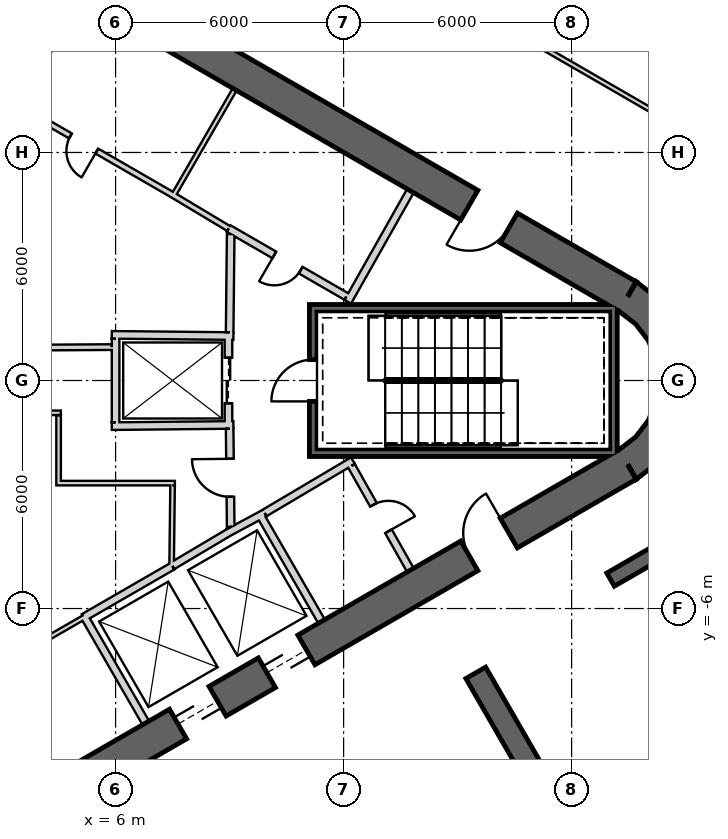
"""IFC4 building model, lengths in metres.
Left out: names, types, materials, properties, quantities, classifications, styles, units other than length and angle.
Written with IfcOpenShell. Run it as: python <this file> out.ifc"""

import sys

from ifc_helpers import new_model, si_unit, direction, frame, frame_2d, origin, place, context, subcontext, project, spatial, polyline, rectangle, outline, extrude, element, fill, save


model = new_model("IFC4")
c1 = context("Model", 3, precision=1e-05, world=origin(), true_north=direction((0.0, 1.0)))
c2 = subcontext(c1, "Body", "Model", "MODEL_VIEW")
j1 = project(units=[si_unit("LENGTHUNIT", "METRE"), si_unit("PLANEANGLEUNIT", "RADIAN")], contexts=[c1])
p1 = place(None, origin())
s1 = spatial("IfcSite", under=j1, at=p1, CompositionType="ELEMENT")
p2 = place(p1, origin())
s2 = spatial("IfcBuilding", under=s1, at=p2, CompositionType="ELEMENT")
p3 = place(p2, frame((0.0, 0.0, -11.0)))
s3 = spatial("IfcBuildingStorey", under=s2, at=p3, CompositionType="ELEMENT", Elevation=-11.0)
p4 = place(p3, frame((19.475, 2.208, -0.4), z_axis=(0.0, 0.0, 1.0), x_axis=(-0.866028369851, 0.499994862586, 0.0)))
e1 = element("IfcWall", 1, at=p4, inside=s3, PredefinedType="SHEAR", context=c2, shape_type="SweptSolid", body=[
    extrude(rectangle(XDim=31.523, YDim=0.9, at=frame_2d((15.762, 0.0))), origin(), (0.0, 0.0, 1.0), 5.9),
])
p5 = place(p4, frame((3.612, 0.0, 0.4)))
e2 = element("IfcOpeningElement", 2, at=p5, cuts=e1, PredefinedType="OPENING", context=c2, shape_type="SweptSolid", body=[
    extrude(rectangle(XDim=1.2, YDim=2.4, at=frame_2d((0.6, 1.2))), frame((0.0, 0.46, 0.0), z_axis=(0.0, -1.0, 0.0), x_axis=(1.0, 0.0, 0.0)), (0.0, 0.0, 1.0), 0.92),
])
p6 = place(p4, frame((26.712, 0.0, 0.4)))
e3 = element("IfcOpeningElement", 3, at=p6, cuts=e1, PredefinedType="OPENING", context=c2, shape_type="SweptSolid", body=[
    extrude(rectangle(XDim=1.2, YDim=2.4, at=frame_2d((0.6, 1.2))), frame((0.0, 0.46, 0.0), z_axis=(0.0, -1.0, 0.0), x_axis=(1.0, 0.0, 0.0)), (0.0, 0.0, 1.0), 0.92),
])
p7 = place(p3, frame((-7.825, -17.97, -0.4), z_axis=(0.0, 0.0, 1.0), x_axis=(0.866028369851, 0.499994862586, 0.0)))
e4 = element("IfcWall", 4, at=p7, inside=s3, PredefinedType="SHEAR", context=c2, shape_type="SweptSolid", body=[
    extrude(rectangle(XDim=31.523, YDim=0.9, at=frame_2d((15.762, 0.0))), origin(), (0.0, 0.0, 1.0), 5.9),
])
p8 = place(p7, frame((17.862, 0.0, 0.4)))
e5 = element("IfcOpeningElement", 5, at=p8, cuts=e4, PredefinedType="OPENING", context=c2, shape_type="SweptSolid", body=[
    extrude(rectangle(XDim=1.2, YDim=2.4, at=frame_2d((0.6, 1.2))), frame((0.0, 0.46, 0.0), z_axis=(0.0, -1.0, 0.0), x_axis=(1.0, 0.0, 0.0)), (0.0, 0.0, 1.0), 0.92),
])
p9 = place(p7, frame((20.562, 0.0, 0.4)))
e6 = element("IfcOpeningElement", 6, at=p9, cuts=e4, PredefinedType="OPENING", context=c2, shape_type="SweptSolid", body=[
    extrude(rectangle(XDim=1.2, YDim=2.4, at=frame_2d((0.6, 1.2))), frame((0.0, 0.46, 0.0), z_axis=(0.0, -1.0, 0.0), x_axis=(1.0, 0.0, 0.0)), (0.0, 0.0, 1.0), 0.92),
])
p10 = place(p7, frame((26.712, 0.0, 0.4)))
e7 = element("IfcOpeningElement", 7, at=p10, cuts=e4, PredefinedType="OPENING", context=c2, shape_type="SweptSolid", body=[
    extrude(rectangle(XDim=1.2, YDim=2.4, at=frame_2d((0.6, 1.2))), frame((0.0, 0.46, 0.0), z_axis=(0.0, -1.0, 0.0), x_axis=(1.0, 0.0, 0.0)), (0.0, 0.0, 1.0), 0.92),
])
p11 = place(p7, frame((3.612, 0.0, 0.4)))
e8 = element("IfcOpeningElement", 8, at=p11, cuts=e4, PredefinedType="OPENING", context=c2, shape_type="SweptSolid", body=[
    extrude(rectangle(XDim=1.2, YDim=2.4, at=frame_2d((0.6, 1.2))), frame((0.0, 0.46, 0.0), z_axis=(0.0, -1.0, 0.0), x_axis=(1.0, 0.0, 0.0)), (0.0, 0.0, 1.0), 0.92),
])
p12 = place(p3, frame((0.0, 0.0, -0.4)))
e9 = element("IfcWall", 9, at=p12, inside=s3, PredefinedType="SHEAR", context=c2, shape_type="SweptSolid", body=[
    extrude(outline(polyline([(19.7, -2.598), (20.321, -2.121), (20.798, -1.5), (21.098, -0.777), (21.2, 0.0), (21.098, 0.777), (20.798, 1.5), (20.321, 2.121), (19.7, 2.598), (19.25, 1.819), (19.685, 1.485), (20.019, 1.05), (20.229, 0.543), (20.3, 0.0), (20.229, -0.543), (20.019, -1.05), (19.685, -1.485), (19.25, -1.819), (19.7, -2.598)])), origin(), (0.0, 0.0, 1.0), 5.9),
])
p13 = place(p3, frame((15.478, -7.692, -0.4), z_axis=(0.0, 0.0, 1.0), x_axis=(0.499977295307, -0.866038511948, 0.0)))
e10 = element("IfcWall", 10, at=p13, inside=s3, PredefinedType="STANDARD", context=c2, shape_type="SweptSolid", body=[
    extrude(rectangle(XDim=3.4, YDim=0.6, at=frame_2d((1.7, 0.0))), origin(), (0.0, 0.0, 1.0), 3.164),
])
p14 = place(p3, frame((36.087, 4.611, -0.4), z_axis=(0.0, 0.0, 1.0), x_axis=(-0.866024629043, -0.500001341888, 0.0)))
e11 = element("IfcWall", 11, at=p14, inside=s3, PredefinedType="SHEAR", context=c2, shape_type="SweptSolid", body=[
    extrude(rectangle(XDim=19.702, YDim=0.4, at=frame_2d((9.851, 0.0))), origin(), (0.0, 0.0, 1.0), 5.5),
])
p15 = place(p3, frame((6.795, -9.01, 0.0), z_axis=(0.0, 0.0, 1.0), x_axis=(-0.499984717929, 0.866034226713, 0.0)))
e12 = element("IfcWall", 12, at=p15, inside=s3, PredefinedType="PLUMBINGWALL", context=c2, shape_type="SweptSolid", body=[
    extrude(rectangle(XDim=3.25, YDim=0.2, at=frame_2d((1.625, 0.0))), origin(), (0.0, 0.0, 1.0), 5.1),
])
p16 = place(p3, frame((5.159, -6.236, 0.0), z_axis=(0.0, 0.0, 1.0), x_axis=(0.866036505625, 0.499980770555, 0.0)))
e13 = element("IfcWall", 13, at=p16, inside=s3, PredefinedType="PLUMBINGWALL", context=c2, shape_type="SweptSolid", body=[
    extrude(rectangle(XDim=2.7, YDim=0.2, at=frame_2d((1.35, 0.0))), origin(), (0.0, 0.0, 1.0), 5.1),
])
p17 = place(p3, frame((9.795, -3.525, 0.0), z_axis=(0.0, 0.0, 1.0), x_axis=(0.499984717929, -0.866034226713, 0.0)))
e14 = element("IfcWall", 14, at=p17, inside=s3, PredefinedType="PLUMBINGWALL", context=c2, shape_type="SweptSolid", body=[
    extrude(rectangle(XDim=3.25, YDim=0.2, at=frame_2d((1.625, 0.0))), origin(), (0.0, 0.0, 1.0), 5.1),
])
p18 = place(p3, frame((8.974, -3.999, 0.0), z_axis=(0.0, 0.0, 1.0), x_axis=(0.880907015104, 0.473289373154, 0.0)))
e15 = element("IfcWall", 15, at=p18, inside=s3, PredefinedType="PLUMBINGWALL", context=c2, shape_type="SweptSolid", body=[
    extrude(rectangle(XDim=1.078, YDim=0.2, at=frame_2d((0.539, 0.0))), origin(), (0.0, 0.0, 1.0), 5.1),
])
p19 = place(p3, frame((7.493, -4.878, 0.0), z_axis=(0.0, 0.0, 1.0), x_axis=(0.859981807212, 0.510324691999, 0.0)))
e16 = element("IfcWall", 16, at=p19, inside=s3, PredefinedType="PLUMBINGWALL", context=c2, shape_type="SweptSolid", body=[
    extrude(rectangle(XDim=1.845, YDim=0.2, at=frame_2d((0.922, 0.0))), origin(), (0.0, 0.0, 1.0), 5.1),
])
p20 = place(p3, frame((19.2, 1.9, -0.4), z_axis=(0.0, 0.0, 1.0), x_axis=(-1.0, 0.0, 0.0)))
e17 = element("IfcWall", 17, at=p20, inside=s3, PredefinedType="SHEAR", context=c2, shape_type="SweptSolid", body=[
    extrude(rectangle(XDim=8.1, YDim=0.2, at=frame_2d((4.05, 0.0))), origin(), (0.0, 0.0, 1.0), 5.5),
])
p21 = place(p3, frame((19.1, -2.0, -0.4), z_axis=(0.0, 0.0, 1.0), x_axis=(0.0, 1.0, 0.0)))
e18 = element("IfcWall", 18, at=p21, inside=s3, PredefinedType="SHEAR", context=c2, shape_type="SweptSolid", body=[
    extrude(rectangle(XDim=3.8, YDim=0.2, at=frame_2d((1.9, 0.0))), origin(), (0.0, 0.0, 1.0), 5.5),
])
p22 = place(p3, frame((11.1, -1.9, -0.4), z_axis=(0.0, 0.0, 1.0), x_axis=(1.0, 0.0, 0.0)))
e19 = element("IfcWall", 19, at=p22, inside=s3, PredefinedType="SHEAR", context=c2, shape_type="SweptSolid", body=[
    extrude(rectangle(XDim=7.9, YDim=0.2, at=frame_2d((3.95, 0.0))), origin(), (0.0, 0.0, 1.0), 5.5),
])
p23 = place(p3, frame((11.2, -1.8, -0.4), z_axis=(0.0, 0.0, 1.0), x_axis=(0.0, 1.0, 0.0)))
e20 = element("IfcWall", 20, at=p23, inside=s3, PredefinedType="SHEAR", context=c2, shape_type="SweptSolid", body=[
    extrude(rectangle(XDim=3.6, YDim=0.2, at=frame_2d((1.8, 0.0))), origin(), (0.0, 0.0, 1.0), 5.5),
])
p24 = place(p23, frame((1.25, 0.0, 0.4)))
e21 = element("IfcOpeningElement", 21, at=p24, cuts=e20, PredefinedType="OPENING", context=c2, shape_type="SweptSolid", body=[
    extrude(rectangle(XDim=1.1, YDim=2.1, at=frame_2d((0.55, 1.05))), frame((0.0, 0.11, 0.0), z_axis=(0.0, -1.0, 0.0), x_axis=(1.0, 0.0, 0.0)), (0.0, 0.0, 1.0), 0.22),
])
p25 = place(p3, frame((8.97, 1.2, 0.0), z_axis=(0.0, 0.0, 1.0), x_axis=(0.0, -1.0, 0.0)))
e22 = element("IfcWall", 22, at=p25, inside=s3, PredefinedType="PLUMBINGWALL", context=c2, shape_type="SweptSolid", body=[
    extrude(rectangle(XDim=2.4, YDim=0.2, at=frame_2d((1.2, 0.0))), origin(), (0.0, 0.0, 1.0), 5.1),
])
p26 = place(p25, frame((0.6, 0.0, 0.0)))
e23 = element("IfcOpeningElement", 23, at=p26, cuts=e22, PredefinedType="OPENING", context=c2, shape_type="SweptSolid", body=[
    extrude(rectangle(XDim=1.2, YDim=2.4, at=frame_2d((0.6, 1.2))), frame((0.0, 0.11, 0.0), z_axis=(0.0, -1.0, 0.0), x_axis=(1.0, 0.0, 0.0)), (0.0, 0.0, 1.0), 0.22),
])
p27 = place(p3, frame((6.0, -1.1, 0.0), z_axis=(0.0, 0.0, 1.0), x_axis=(0.0, 1.0, 0.0)))
e24 = element("IfcWall", 24, at=p27, inside=s3, PredefinedType="PLUMBINGWALL", context=c2, shape_type="SweptSolid", body=[
    extrude(rectangle(XDim=2.2, YDim=0.2, at=frame_2d((1.1, 0.0))), origin(), (0.0, 0.0, 1.0), 5.1),
])
for number, where, z_axis, x_axis in (
    (25, (5.9, 1.201, 0.0), (0.0, 0.0, 1.0), (1.0, -0.01, 0.0)),
    (26, (5.9, -1.201, 0.0), (0.0, 0.0, 1.0), (1.0, 0.01, 0.0)),
):
    element("IfcWall", number, at=place(p3, frame(where, z_axis=z_axis, x_axis=x_axis)), inside=s3, PredefinedType="PLUMBINGWALL", context=c2, shape_type="SweptSolid", body=[
        extrude(rectangle(XDim=3.2, YDim=0.2, at=frame_2d((1.6, 0.0))), origin(), (0.0, 0.0, 1.0), 5.1),
    ])
p28 = place(p3, frame((9.133, 7.659, 0.0), z_axis=(0.0, 0.0, 1.0), x_axis=(-0.500017246033, -0.866015446554, 0.0)))
e27 = element("IfcWall", 27, at=p28, inside=s3, PredefinedType="PARTITIONING", context=c2, shape_type="SweptSolid", body=[
    extrude(rectangle(XDim=3.25, YDim=0.12, at=frame_2d((1.625, 0.0))), origin(), (0.0, 0.0, 1.0), 5.1),
])
p29 = place(p3, frame((12.11, 2.073, 0.0), z_axis=(0.0, 0.0, 1.0), x_axis=(0.49196600604, 0.870614408852, 0.0)))
e28 = element("IfcWall", 28, at=p29, inside=s3, PredefinedType="PARTITIONING", context=c2, shape_type="SweptSolid", body=[
    extrude(rectangle(XDim=3.35, YDim=0.2, at=frame_2d((1.675, 0.0))), origin(), (0.0, 0.0, 1.0), 5.1),
])
p30 = place(p3, frame((8.974, 3.999, 0.0), z_axis=(0.0, 0.0, 1.0), x_axis=(0.86601284211, -0.500021756827, 0.0)))
e29 = element("IfcWall", 29, at=p30, inside=s3, PredefinedType="PARTITIONING", context=c2, shape_type="SweptSolid", body=[
    extrude(rectangle(XDim=3.577, YDim=0.2, at=frame_2d((1.789, 0.0))), origin(), (0.0, 0.0, 1.0), 5.1),
])
p31 = place(p30, frame((1.389, 0.0, 0.0)))
e30 = element("IfcOpeningElement", 30, at=p31, cuts=e29, PredefinedType="OPENING", context=c2, shape_type="SweptSolid", body=[
    extrude(rectangle(XDim=0.8, YDim=2.1, at=frame_2d((0.4, 1.05))), frame((0.0, 0.11, 0.0), z_axis=(0.0, -1.0, 0.0), x_axis=(1.0, 0.0, 0.0)), (0.0, 0.0, 1.0), 0.22),
])
p32 = place(p3, frame((8.975, 4.0, 0.0), z_axis=(0.0, 0.0, 1.0), x_axis=(-0.857530436795, 0.514433231791, 0.0)))
e31 = element("IfcWall", 31, at=p32, inside=s3, PredefinedType="PLUMBINGWALL", context=c2, shape_type="SweptSolid", body=[
    extrude(rectangle(XDim=1.723, YDim=0.15, at=frame_2d((0.861, 0.0))), origin(), (0.0, 0.0, 1.0), 5.1),
])
p33 = place(p3, frame((4.457, 10.359, 0.0), z_axis=(0.0, 0.0, 1.0), x_axis=(-0.500017246033, -0.866015446554, 0.0)))
e32 = element("IfcWall", 32, at=p33, inside=s3, PredefinedType="PARTITIONING", context=c2, shape_type="SweptSolid", body=[
    extrude(rectangle(XDim=3.25, YDim=0.12, at=frame_2d((1.625, 0.0))), origin(), (0.0, 0.0, 1.0), 5.1),
])
p34 = place(p33, frame((1.225, 0.0, 0.0)))
e33 = element("IfcOpeningElement", 33, at=p34, cuts=e32, PredefinedType="OPENING", context=c2, shape_type="SweptSolid", body=[
    extrude(rectangle(XDim=0.8, YDim=2.1, at=frame_2d((0.4, 1.05))), frame((0.0, 0.07, 0.0), z_axis=(0.0, -1.0, 0.0), x_axis=(1.0, 0.0, 0.0)), (0.0, 0.0, 1.0), 0.14),
])
p35 = place(p3, frame((7.497, 4.886, 0.0), z_axis=(0.0, 0.0, 1.0), x_axis=(-0.866030989016, 0.499990325971, 0.0)))
e34 = element("IfcWall", 34, at=p35, inside=s3, PredefinedType="PLUMBINGWALL", context=c2, shape_type="SweptSolid", body=[
    extrude(rectangle(XDim=8.1, YDim=0.15, at=frame_2d((4.05, 0.0))), origin(), (0.0, 0.0, 1.0), 5.1),
])
p36 = place(p35, frame((2.3, 0.0, 0.0)))
e35 = element("IfcOpeningElement", 35, at=p36, cuts=e34, PredefinedType="OPENING", context=c2, shape_type="SweptSolid", body=[
    extrude(rectangle(XDim=0.8, YDim=2.1, at=frame_2d((0.4, 1.05))), frame((0.0, 0.085, 0.0), z_axis=(0.0, -1.0, 0.0), x_axis=(1.0, 0.0, 0.0)), (0.0, 0.0, 1.0), 0.17),
])
p37 = place(p3, frame((0.483, -8.936, 0.0), z_axis=(0.0, 0.0, 1.0), x_axis=(0.866028230842, 0.499995103361, 0.0)))
e36 = element("IfcWall", 36, at=p37, inside=s3, PredefinedType="PARTITIONING", context=c2, shape_type="SweptSolid", body=[
    extrude(rectangle(XDim=5.4, YDim=0.12, at=frame_2d((2.7, 0.0))), origin(), (0.0, 0.0, 1.0), 5.1),
])
p38 = place(p37, frame((2.3, 0.0, 0.0)))
e37 = element("IfcOpeningElement", 37, at=p38, cuts=e36, PredefinedType="OPENING", context=c2, shape_type="SweptSolid", body=[
    extrude(rectangle(XDim=0.8, YDim=2.1, at=frame_2d((0.4, 1.05))), frame((0.0, 0.07, 0.0), z_axis=(0.0, -1.0, 0.0), x_axis=(1.0, 0.0, 0.0)), (0.0, 0.0, 1.0), 0.14),
])
p39 = place(p3, frame((12.245, -2.109, 0.0), z_axis=(0.0, 0.0, 1.0), x_axis=(-0.860414880418, -0.509594185166, 0.0)))
e38 = element("IfcWall", 38, at=p39, inside=s3, PredefinedType="PARTITIONING", context=c2, shape_type="SweptSolid", body=[
    extrude(rectangle(XDim=2.7, YDim=0.2, at=frame_2d((1.35, 0.0))), origin(), (0.0, 0.0, 1.0), 5.1),
])
p40 = place(p3, frame((13.758, -4.99, 0.0), z_axis=(0.0, 0.0, 1.0), x_axis=(-0.491993409184, 0.87059892334, 0.0)))
e39 = element("IfcWall", 39, at=p40, inside=s3, PredefinedType="PARTITIONING", context=c2, shape_type="SweptSolid", body=[
    extrude(rectangle(XDim=3.15, YDim=0.2, at=frame_2d((1.575, 0.0))), origin(), (0.0, 0.0, 1.0), 5.1),
])
p41 = place(p40, frame((1.175, 0.0, 0.0)))
e40 = element("IfcOpeningElement", 40, at=p41, cuts=e39, PredefinedType="OPENING", context=c2, shape_type="SweptSolid", body=[
    extrude(rectangle(XDim=0.8, YDim=2.1, at=frame_2d((0.4, 1.05))), frame((0.0, 0.11, 0.0), z_axis=(0.0, -1.0, 0.0), x_axis=(1.0, 0.0, 0.0)), (0.0, 0.0, 1.0), 0.22),
])
p42 = place(p3, frame((9.001, 1.27, 0.0), z_axis=(0.0, 0.0, 1.0), x_axis=(0.010780534828, 0.999941888346, 0.0)))
e41 = element("IfcWall", 41, at=p42, inside=s3, PredefinedType="PARTITIONING", context=c2, shape_type="SweptSolid", body=[
    extrude(rectangle(XDim=2.582, YDim=0.2, at=frame_2d((1.291, 0.0))), origin(), (0.0, 0.0, 1.0), 5.1),
])
p43 = place(p3, frame((9.029, -3.851, 0.0), z_axis=(0.0, 0.0, 1.0), x_axis=(-0.010783593937, 0.99994185536, 0.0)))
e42 = element("IfcWall", 42, at=p43, inside=s3, PredefinedType="PARTITIONING", context=c2, shape_type="SweptSolid", body=[
    extrude(rectangle(XDim=2.581, YDim=0.2, at=frame_2d((1.291, 0.0))), origin(), (0.0, 0.0, 1.0), 5.1),
])
p44 = place(p43, frame((0.791, 0.0, 0.0)))
e43 = element("IfcOpeningElement", 43, at=p44, cuts=e42, PredefinedType="OPENING", context=c2, shape_type="SweptSolid", body=[
    extrude(rectangle(XDim=1.0, YDim=2.1, at=frame_2d((0.5, 1.05))), frame((0.0, 0.11, 0.0), z_axis=(0.0, -1.0, 0.0), x_axis=(1.0, 0.0, 0.0)), (0.0, 0.0, 1.0), 0.22),
])
p45 = place(p3, frame((1.344, 0.849, 0.0), z_axis=(0.0, 0.0, 1.0), x_axis=(0.999978627641, 0.00653790957, 0.0)))
e44 = element("IfcWall", 44, at=p45, inside=s3, PredefinedType="PLUMBINGWALL", context=c2, shape_type="SweptSolid", body=[
    extrude(rectangle(XDim=4.556, YDim=0.15, at=frame_2d((2.278, 0.0))), origin(), (0.0, 0.0, 1.0), 5.1),
])
p46 = place(p45, frame((1.942, 0.0, 0.0)))
e45 = element("IfcOpeningElement", 45, at=p46, cuts=e44, PredefinedType="OPENING", context=c2, shape_type="SweptSolid", body=[
    extrude(rectangle(XDim=0.8, YDim=2.1, at=frame_2d((0.4, 1.05))), frame((0.0, 0.085, 0.0), z_axis=(0.0, -1.0, 0.0), x_axis=(1.0, 0.0, 0.0)), (0.0, 0.0, 1.0), 0.17),
])
p47 = place(p3, frame((4.56, -0.85, 0.0), z_axis=(0.0, 0.0, 1.0), x_axis=(-1.0, 0.0, 0.0)))
e46 = element("IfcWall", 46, at=p47, inside=s3, PredefinedType="PARTITIONING", context=c2, shape_type="SweptSolid", body=[
    extrude(rectangle(XDim=3.069, YDim=0.12, at=frame_2d((1.535, 0.0))), origin(), (0.0, 0.0, 1.0), 5.1),
])
p48 = place(p3, frame((4.5, -2.76, 0.0), z_axis=(0.0, 0.0, 1.0), x_axis=(0.0, 1.0, 0.0)))
e47 = element("IfcWall", 47, at=p48, inside=s3, PredefinedType="PARTITIONING", context=c2, shape_type="SweptSolid", body=[
    extrude(rectangle(XDim=1.85, YDim=0.12, at=frame_2d((0.925, 0.0))), origin(), (0.0, 0.0, 1.0), 5.1),
])
p49 = place(p3, frame((7.56, -2.7, 0.0), z_axis=(0.0, 0.0, 1.0), x_axis=(-1.0, 0.0, 0.0)))
e48 = element("IfcWall", 48, at=p49, inside=s3, PredefinedType="PARTITIONING", context=c2, shape_type="SweptSolid", body=[
    extrude(rectangle(XDim=3.0, YDim=0.12, at=frame_2d((1.5, 0.0))), origin(), (0.0, 0.0, 1.0), 5.1),
])
p50 = place(p3, frame((7.475, -4.865, 0.0), z_axis=(0.0, 0.0, 1.0), x_axis=(0.011716133148, 0.999931363757, 0.0)))
e49 = element("IfcWall", 49, at=p50, inside=s3, PredefinedType="PARTITIONING", context=c2, shape_type="SweptSolid", body=[
    extrude(rectangle(XDim=2.105, YDim=0.12, at=frame_2d((1.052, 0.0))), origin(), (0.0, 0.0, 1.0), 5.1),
])
p51 = place(p3, frame((30.376, 1.169, 0.0), z_axis=(0.0, 0.0, 1.0), x_axis=(-0.865777000343, 0.500430000777, 0.0)))
e50 = element("IfcWall", 50, at=p51, inside=s3, PredefinedType="PARTITIONING", context=c2, shape_type="SweptSolid", body=[
    extrude(rectangle(XDim=39.978, YDim=0.12, at=frame_2d((19.989, 0.0))), origin(), (0.0, 0.0, 1.0), 4.18),
])
p52 = place(p51, frame((28.784, 0.0, 0.0)))
e51 = element("IfcOpeningElement", 51, at=p52, cuts=e50, PredefinedType="OPENING", context=c2, shape_type="SweptSolid", body=[
    extrude(rectangle(XDim=1.2, YDim=2.4, at=frame_2d((0.6, 1.2))), frame((0.0, 0.07, 0.0), z_axis=(0.0, -1.0, 0.0), x_axis=(1.0, 0.0, 0.0)), (0.0, 0.0, 1.0), 0.14),
])
p53 = place(p51, frame((9.984, 0.0, 0.0)))
e52 = element("IfcOpeningElement", 52, at=p53, cuts=e50, PredefinedType="OPENING", context=c2, shape_type="SweptSolid", body=[
    extrude(rectangle(XDim=1.2, YDim=2.4, at=frame_2d((0.6, 1.2))), frame((0.0, 0.07, 0.0), z_axis=(0.0, -1.0, 0.0), x_axis=(1.0, 0.0, 0.0)), (0.0, 0.0, 1.0), 0.14),
])
p54 = place(p24, origin())
e53 = element("IfcDoor", 53, at=p54, inside=s3, OperationType="SINGLE_SWING_LEFT", PredefinedType="USERDEFINED", context=c2, shape_type="SweptSolid", body=[
    extrude(rectangle(XDim=1.1, YDim=2.1, at=frame_2d((0.55, 1.05))), frame((0.0, 0.025, 0.0), z_axis=(0.0, -1.0, 0.0), x_axis=(1.0, 0.0, 0.0)), (0.0, 0.0, 1.0), 0.05),
])
fill(e21, e53)
p55 = place(p44, origin())
e54 = element("IfcDoor", 54, at=p55, inside=s3, OperationType="SINGLE_SWING_RIGHT", PredefinedType="USERDEFINED", context=c2, shape_type="SweptSolid", body=[
    extrude(rectangle(XDim=1.0, YDim=2.1, at=frame_2d((0.5, 1.05))), frame((0.0, 0.025, 0.0), z_axis=(0.0, -1.0, 0.0), x_axis=(1.0, 0.0, 0.0)), (0.0, 0.0, 1.0), 0.05),
])
fill(e43, e54)
p56 = place(p26, origin())
e55 = element("IfcDoor", 55, at=p56, inside=s3, OperationType="SLIDING_TO_LEFT", PredefinedType="USERDEFINED", context=c2, shape_type="SweptSolid", body=[
    extrude(rectangle(XDim=1.2, YDim=2.4, at=frame_2d((0.6, 1.2))), frame((0.0, 0.025, 0.0), z_axis=(0.0, -1.0, 0.0), x_axis=(1.0, 0.0, 0.0)), (0.0, 0.0, 1.0), 0.05),
])
fill(e23, e55)
p57 = place(p31, origin())
e56 = element("IfcDoor", 56, at=p57, inside=s3, OperationType="SINGLE_SWING_LEFT", PredefinedType="USERDEFINED", context=c2, shape_type="SweptSolid", body=[
    extrude(rectangle(XDim=0.8, YDim=2.1, at=frame_2d((0.4, 1.05))), frame((0.0, 0.025, 0.0), z_axis=(0.0, -1.0, 0.0), x_axis=(1.0, 0.0, 0.0)), (0.0, 0.0, 1.0), 0.05),
])
fill(e30, e56)
p58 = place(p41, origin())
e57 = element("IfcDoor", 57, at=p58, inside=s3, OperationType="SINGLE_SWING_LEFT", PredefinedType="USERDEFINED", context=c2, shape_type="SweptSolid", body=[
    extrude(rectangle(XDim=0.8, YDim=2.1, at=frame_2d((0.4, 1.05))), frame((0.0, 0.025, 0.0), z_axis=(0.0, -1.0, 0.0), x_axis=(1.0, 0.0, 0.0)), (0.0, 0.0, 1.0), 0.05),
])
fill(e40, e57)
p59 = place(p36, origin())
e58 = element("IfcDoor", 58, at=p59, inside=s3, OperationType="SINGLE_SWING_LEFT", PredefinedType="USERDEFINED", context=c2, shape_type="SweptSolid", body=[
    extrude(rectangle(XDim=0.8, YDim=2.1, at=frame_2d((0.4, 1.05))), frame((0.0, 0.025, 0.0), z_axis=(0.0, -1.0, 0.0), x_axis=(1.0, 0.0, 0.0)), (0.0, 0.0, 1.0), 0.05),
])
fill(e35, e58)
p60 = place(p8, origin())
e59 = element("IfcDoor", 59, at=p60, inside=s3, OperationType="SLIDING_TO_LEFT", PredefinedType="USERDEFINED", context=c2, shape_type="SweptSolid", body=[
    extrude(rectangle(XDim=1.2, YDim=2.4, at=frame_2d((0.6, 1.2))), frame((0.0, 0.025, 0.0), z_axis=(0.0, -1.0, 0.0), x_axis=(1.0, 0.0, 0.0)), (0.0, 0.0, 1.0), 0.05),
])
fill(e5, e59)
p61 = place(p9, origin())
e60 = element("IfcDoor", 60, at=p61, inside=s3, OperationType="SLIDING_TO_LEFT", PredefinedType="USERDEFINED", context=c2, shape_type="SweptSolid", body=[
    extrude(rectangle(XDim=1.2, YDim=2.4, at=frame_2d((0.6, 1.2))), frame((0.0, 0.025, 0.0), z_axis=(0.0, -1.0, 0.0), x_axis=(1.0, 0.0, 0.0)), (0.0, 0.0, 1.0), 0.05),
])
fill(e6, e60)
p62 = place(p10, origin())
e61 = element("IfcDoor", 61, at=p62, inside=s3, OperationType="SINGLE_SWING_RIGHT", PredefinedType="USERDEFINED", context=c2, shape_type="SweptSolid", body=[
    extrude(rectangle(XDim=1.2, YDim=2.4, at=frame_2d((0.6, 1.2))), frame((0.0, 0.025, 0.0), z_axis=(0.0, -1.0, 0.0), x_axis=(1.0, 0.0, 0.0)), (0.0, 0.0, 1.0), 0.05),
])
fill(e7, e61)
p63 = place(p5, origin())
e62 = element("IfcDoor", 62, at=p63, inside=s3, OperationType="SINGLE_SWING_RIGHT", PredefinedType="USERDEFINED", context=c2, shape_type="SweptSolid", body=[
    extrude(rectangle(XDim=1.2, YDim=2.4, at=frame_2d((0.6, 1.2))), frame((0.0, 0.025, 0.0), z_axis=(0.0, -1.0, 0.0), x_axis=(1.0, 0.0, 0.0)), (0.0, 0.0, 1.0), 0.05),
])
fill(e2, e62)
save(model, sys.argv[1])
